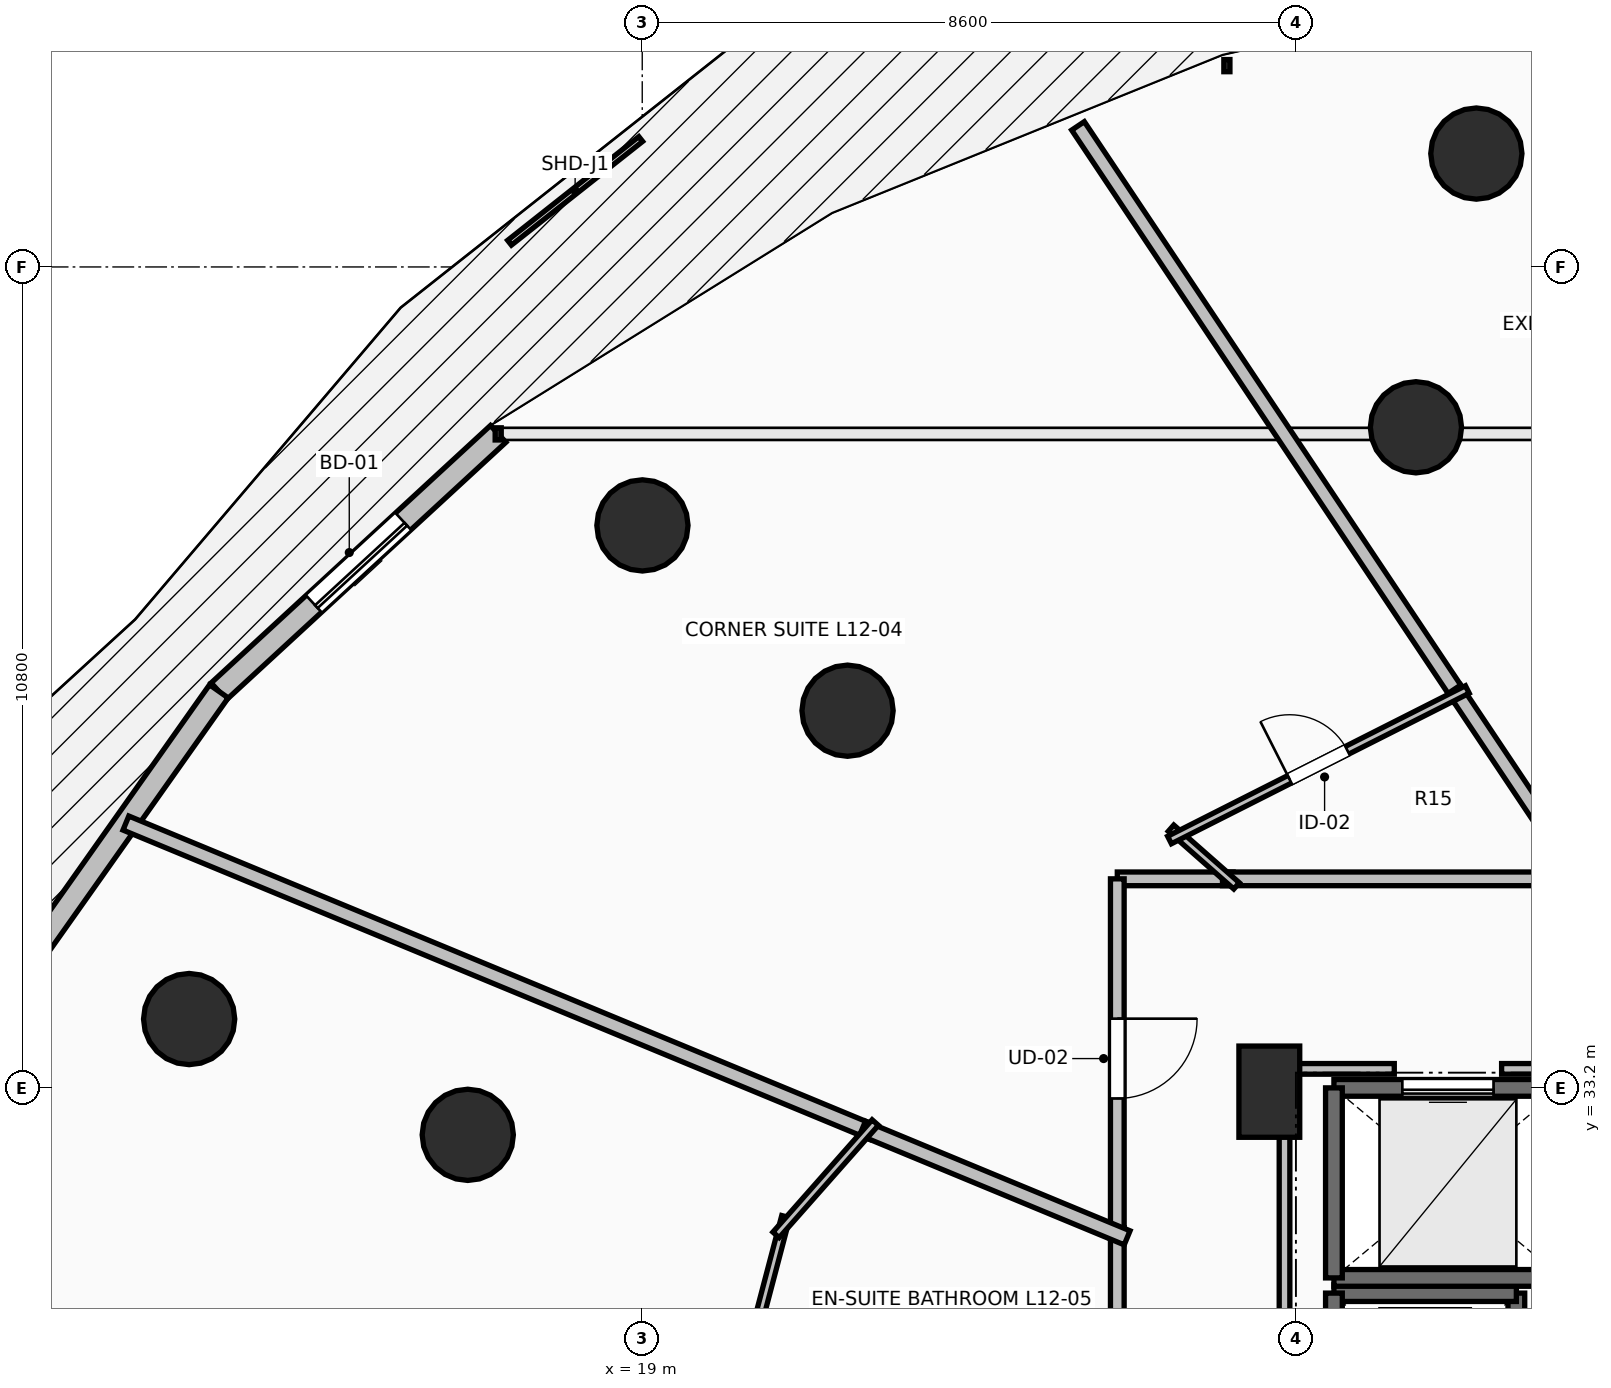
"""IFC4 building model, lengths in metres.
Left out: names, types, materials, properties, quantities, classifications, styles, units other than length and angle.
Written with IfcOpenShell. Run it as: python <this file> out.ifc"""

import sys

from ifc_helpers import new_model, si_unit, direction, frame, frame_2d, origin, origin_2d, place, context, subcontext, project, spatial, rectangle, circle, extrude, element, fill, save


model = new_model("IFC4")
c1 = context("Model", 3, precision=1e-05, world=origin(), true_north=direction((0.0, 1.0)))
c2 = subcontext(c1, "Body", "Model", "MODEL_VIEW")
j1 = project(units=[si_unit("LENGTHUNIT", "METRE"), si_unit("PLANEANGLEUNIT", "RADIAN")], contexts=[c1])
p1 = place(None, origin())
s1 = spatial("IfcSite", under=j1, at=p1, CompositionType="ELEMENT")
p2 = place(p1, origin())
s2 = spatial("IfcBuilding", under=s1, at=p2, CompositionType="ELEMENT")
p3 = place(p2, frame((0.0, 0.0, 48.5)))
s3 = spatial("IfcBuildingStorey", under=s2, at=p3, CompositionType="ELEMENT", Elevation=48.5)
for number, where, z_axis, x_axis in (
    (1, (29.179, 41.891, 0.0), (0.0, 0.0, 1.0), (-0.383, 0.924, 0.0)),
    (2, (21.701, 38.162, 0.0), (0.0, 0.0, 1.0), (-0.707, 0.707, 0.0)),
    (3, (16.705, 32.582, 0.0), (0.0, 0.0, 1.0), (-0.924, 0.383, 0.0)),
    (4, (29.974, 45.492, 0.0), (0.0, 0.0, 1.0), (-0.383, 0.924, 0.0)),
    (5, (19.003, 40.6, 0.0), (0.0, 0.0, 1.0), (-0.707, 0.707, 0.0)),
    (6, (13.039, 34.105, 0.0), (0.0, 0.0, 1.0), (-0.924, 0.383, 0.0)),
):
    element("IfcColumn", number, at=place(p3, frame(where, z_axis=z_axis, x_axis=x_axis)), inside=s3, PredefinedType="COLUMN", context=c2, shape_type="SweptSolid", body=[
        extrude(circle(Radius=0.6, at=origin_2d()), origin(), (0.0, 0.0, 1.0), 3.5),
    ])
p4 = place(p3, frame((27.25, 33.15, 0.0), z_axis=(0.0, 0.0, 1.0), x_axis=(1.0, 0.0, 0.0)))
e7 = element("IfcColumn", 7, at=p4, inside=s3, PredefinedType="PILASTER", context=c2, shape_type="SweptSolid", body=[
    extrude(rectangle(XDim=0.8, YDim=1.2, at=origin_2d()), origin(), (0.0, 0.0, 1.0), 3.5),
])
p5 = place(p3, frame((17.105, 41.804, 0.0), z_axis=(0.0, 0.0, 1.0), x_axis=(-0.735342629635, -0.677695519419, 0.0)))
e8 = element("IfcWall", 8, at=p5, inside=s3, PredefinedType="STANDARD", context=c2, shape_type="SweptSolid", body=[
    extrude(rectangle(XDim=4.997, YDim=0.3, at=frame_2d((2.499, 0.0))), origin(), (0.0, 0.0, 1.0), 3.24),
])
p6 = place(p5, frame((1.699, 0.0, 0.0)))
e9 = element("IfcOpeningElement", 9, at=p6, cuts=e8, PredefinedType="OPENING", context=c2, shape_type="SweptSolid", body=[
    extrude(rectangle(XDim=1.6, YDim=2.3, at=frame_2d((0.8, 1.15))), frame((0.0, 0.165, 0.0), z_axis=(0.0, -1.0, 0.0), x_axis=(1.0, 0.0, 0.0)), (0.0, 0.0, 1.0), 0.33),
])
p7 = place(p3, frame((13.43, 38.417, 0.0), z_axis=(0.0, 0.0, 1.0), x_axis=(-0.577130815624, -0.816651713803, 0.0)))
e10 = element("IfcWall", 10, at=p7, inside=s3, PredefinedType="STANDARD", context=c2, shape_type="SweptSolid", body=[
    extrude(rectangle(XDim=4.731, YDim=0.3, at=frame_2d((2.366, 0.0))), origin(), (0.0, 0.0, 1.0), 3.24),
])
p8 = place(p3, frame((30.5, 28.0, 0.0), z_axis=(0.0, 0.0, 1.0), x_axis=(0.0, 1.0, 0.0)))
e11 = element("IfcWall", 11, at=p8, inside=s3, PredefinedType="SHEAR", context=c2, shape_type="SweptSolid", body=[
    extrude(rectangle(XDim=2.5, YDim=0.22, at=frame_2d((1.25, 0.0))), origin(), (0.0, 0.0, 1.0), 3.24),
])
p9 = place(p3, frame((30.5, 30.5, 0.0), z_axis=(0.0, 0.0, 1.0), x_axis=(-1.0, 0.0, 0.0)))
e12 = element("IfcWall", 12, at=p9, inside=s3, PredefinedType="SHEAR", context=c2, shape_type="SweptSolid", body=[
    extrude(rectangle(XDim=2.4, YDim=0.22, at=frame_2d((1.2, 0.0))), origin(), (0.0, 0.0, 1.0), 3.24),
])
p10 = place(p3, frame((28.1, 30.5, 0.0), z_axis=(0.0, 0.0, 1.0), x_axis=(0.0, -1.0, 0.0)))
e13 = element("IfcWall", 13, at=p10, inside=s3, PredefinedType="SHEAR", context=c2, shape_type="SweptSolid", body=[
    extrude(rectangle(XDim=2.5, YDim=0.22, at=frame_2d((1.25, 0.0))), origin(), (0.0, 0.0, 1.0), 3.24),
])
p11 = place(p3, frame((28.1, 30.7, 0.0), z_axis=(0.0, 0.0, 1.0), x_axis=(1.0, 0.0, 0.0)))
e14 = element("IfcWall", 14, at=p11, inside=s3, PredefinedType="SOLIDWALL", context=c2, shape_type="SweptSolid", body=[
    extrude(rectangle(XDim=3.0, YDim=0.22, at=frame_2d((1.5, 0.0))), origin(), (0.0, 0.0, 1.0), 3.24),
])
p12 = place(p3, frame((31.1, 33.2, 0.0), z_axis=(0.0, 0.0, 1.0), x_axis=(-1.0, 0.0, 0.0)))
e15 = element("IfcWall", 15, at=p12, inside=s3, PredefinedType="SOLIDWALL", context=c2, shape_type="SweptSolid", body=[
    extrude(rectangle(XDim=3.0, YDim=0.22, at=frame_2d((1.5, 0.0))), origin(), (0.0, 0.0, 1.0), 3.24),
])
p13 = place(p12, frame((0.9, 0.0, 0.0)))
e16 = element("IfcOpeningElement", 16, at=p13, cuts=e15, PredefinedType="OPENING", context=c2, shape_type="SweptSolid", body=[
    extrude(rectangle(XDim=1.2, YDim=2.2, at=frame_2d((0.6, 1.1))), frame((0.0, 0.125, 0.0), z_axis=(0.0, -1.0, 0.0), x_axis=(1.0, 0.0, 0.0)), (0.0, 0.0, 1.0), 0.25),
])
p14 = place(p3, frame((28.1, 33.2, 0.0), z_axis=(0.0, 0.0, 1.0), x_axis=(0.0, -1.0, 0.0)))
e17 = element("IfcWall", 17, at=p14, inside=s3, PredefinedType="SOLIDWALL", context=c2, shape_type="SweptSolid", body=[
    extrude(rectangle(XDim=2.5, YDim=0.22, at=frame_2d((1.25, 0.0))), origin(), (0.0, 0.0, 1.0), 3.24),
])
p15 = place(p3, frame((26.774, 35.95, 0.0), z_axis=(0.0, 0.0, 1.0), x_axis=(-1.0, 0.0, 0.0)))
e18 = element("IfcWall", 18, at=p15, inside=s3, PredefinedType="PARTITIONING", context=c2, shape_type="SweptSolid", body=[
    extrude(rectangle(XDim=1.524, YDim=0.18, at=frame_2d((0.762, 0.0))), origin(), (0.0, 0.0, 1.0), 2.886),
])
p16 = place(p3, frame((25.25, 35.95, 0.0), z_axis=(0.0, 0.0, 1.0), x_axis=(0.0, -1.0, 0.0)))
e19 = element("IfcWall", 19, at=p16, inside=s3, PredefinedType="PARTITIONING", context=c2, shape_type="SweptSolid", body=[
    extrude(rectangle(XDim=4.729, YDim=0.18, at=frame_2d((2.365, 0.0))), origin(), (0.0, 0.0, 1.0), 2.432),
])
p17 = place(p16, frame((1.84, 0.0, 0.0)))
e20 = element("IfcOpeningElement", 20, at=p17, cuts=e19, PredefinedType="OPENING", context=c2, shape_type="SweptSolid", body=[
    extrude(rectangle(XDim=1.05, YDim=2.2, at=frame_2d((0.525, 1.1))), frame((0.0, 0.105, 0.0), z_axis=(0.0, -1.0, 0.0), x_axis=(1.0, 0.0, 0.0)), (0.0, 0.0, 1.0), 0.21),
])
p18 = place(p3, frame((31.42, 35.95, 0.0), z_axis=(0.0, 0.0, 1.0), x_axis=(-1.0, 0.0, 0.0)))
e21 = element("IfcWall", 21, at=p18, inside=s3, PredefinedType="PARTITIONING", context=c2, shape_type="SweptSolid", body=[
    extrude(rectangle(XDim=4.786, YDim=0.18, at=frame_2d((2.393, 0.0))), origin(), (0.0, 0.0, 1.0), 2.432),
])
p19 = place(p3, frame((25.25, 31.361, 0.0), z_axis=(0.0, 0.0, 1.0), x_axis=(0.0, -1.0, 0.0)))
e22 = element("IfcWall", 22, at=p19, inside=s3, PredefinedType="PARTITIONING", context=c2, shape_type="SweptSolid", body=[
    extrude(rectangle(XDim=3.727, YDim=0.18, at=frame_2d((1.864, 0.0))), origin(), (0.0, 0.0, 1.0), 2.432),
])
p20 = place(p3, frame((24.733, 45.856, 0.0), z_axis=(0.0, 0.0, 1.0), x_axis=(0.555564858458, -0.831473203444, 0.0)))
e23 = element("IfcWall", 23, at=p20, inside=s3, PredefinedType="PARTITIONING", context=c2, shape_type="SweptSolid", body=[
    extrude(rectangle(XDim=9.054, YDim=0.2, at=frame_2d((4.527, 0.0))), origin(), (0.0, 0.0, 1.0), 2.432),
])
p21 = place(p3, frame((29.685, 38.444, 0.0), z_axis=(0.0, 0.0, 1.0), x_axis=(0.555596981897, -0.831451738652, 0.0)))
e24 = element("IfcWall", 24, at=p21, inside=s3, PredefinedType="PARTITIONING", context=c2, shape_type="SweptSolid", body=[
    extrude(rectangle(XDim=3.14, YDim=0.2, at=frame_2d((1.57, 0.0))), origin(), (0.0, 0.0, 1.0), 2.432),
])
p22 = place(p3, frame((26.819, 35.857, 0.0), z_axis=(0.0, 0.0, 1.0), x_axis=(-0.750624975639, 0.660728496394, 0.0)))
e25 = element("IfcWall", 25, at=p22, inside=s3, PredefinedType="PARTITIONING", context=c2, shape_type="SweptSolid", body=[
    extrude(rectangle(XDim=1.149, YDim=0.11, at=frame_2d((0.574, 0.0))), origin(), (0.0, 0.0, 1.0), 2.886),
])
p23 = place(p3, frame((25.937, 36.461, 0.0), z_axis=(0.0, 0.0, 1.0), x_axis=(0.892461080662, 0.451124394711, 0.0)))
e26 = element("IfcWall", 26, at=p23, inside=s3, PredefinedType="PARTITIONING", context=c2, shape_type="SweptSolid", body=[
    extrude(rectangle(XDim=4.39, YDim=0.11, at=frame_2d((2.195, 0.0))), origin(), (0.0, 0.0, 1.0), 2.432),
])
p24 = place(p23, frame((1.77, 0.0, 0.0)))
e27 = element("IfcOpeningElement", 27, at=p24, cuts=e26, PredefinedType="OPENING", context=c2, shape_type="SweptSolid", body=[
    extrude(rectangle(XDim=0.85, YDim=2.1, at=frame_2d((0.425, 1.05))), frame((0.0, 0.07, 0.0), z_axis=(0.0, -1.0, 0.0), x_axis=(1.0, 0.0, 0.0)), (0.0, 0.0, 1.0), 0.14),
])
p25 = place(p3, frame((12.207, 36.684, 0.0), z_axis=(0.0, 0.0, 1.0), x_axis=(0.923876032578, -0.382691881842, 0.0)))
e28 = element("IfcWall", 28, at=p25, inside=s3, PredefinedType="PARTITIONING", context=c2, shape_type="SweptSolid", body=[
    extrude(rectangle(XDim=10.63, YDim=0.2, at=frame_2d((5.315, 0.0))), origin(), (0.0, 0.0, 1.0), 2.624),
])
p26 = place(p3, frame((21.899, 32.669, 0.0), z_axis=(0.0, 0.0, 1.0), x_axis=(0.923843852071, -0.382769561211, 0.0)))
e29 = element("IfcWall", 29, at=p26, inside=s3, PredefinedType="PARTITIONING", context=c2, shape_type="SweptSolid", body=[
    extrude(rectangle(XDim=3.768, YDim=0.2, at=frame_2d((1.884, 0.0))), origin(), (0.0, 0.0, 1.0), 2.886),
])
p27 = place(p3, frame((20.037, 28.273, 0.0), z_axis=(0.0, 0.0, 1.0), x_axis=(0.254593926267, 0.967048050878, 0.0)))
e30 = element("IfcWall", 30, at=p27, inside=s3, PredefinedType="PARTITIONING", context=c2, shape_type="SweptSolid", body=[
    extrude(rectangle(XDim=3.344, YDim=0.11, at=frame_2d((1.672, 0.0))), origin(), (0.0, 0.0, 1.0), 2.432),
])
p28 = place(p3, frame((20.76, 31.266, 0.0), z_axis=(0.0, 0.0, 1.0), x_axis=(0.662047420969, 0.749461948593, 0.0)))
e31 = element("IfcWall", 31, at=p28, inside=s3, PredefinedType="PARTITIONING", context=c2, shape_type="SweptSolid", body=[
    extrude(rectangle(XDim=1.972, YDim=0.11, at=frame_2d((0.986, 0.0))), origin(), (0.0, 0.0, 1.0), 3.24),
])
p29 = place(p3, frame((27.45, 28.196, 0.0), z_axis=(0.0, 0.0, 1.0), x_axis=(0.0, 1.0, 0.0)))
e32 = element("IfcWall", 32, at=p29, inside=s3, PredefinedType="PARTITIONING", context=c2, shape_type="SweptSolid", body=[
    extrude(rectangle(XDim=5.254, YDim=0.14, at=frame_2d((2.627, 0.0))), origin(), (0.0, 0.0, 1.0), 2.432),
])
p30 = place(p3, frame((27.45, 33.45, 0.0), z_axis=(0.0, 0.0, 1.0), x_axis=(1.0, 0.0, 0.0)))
e33 = element("IfcWall", 33, at=p30, inside=s3, PredefinedType="PARTITIONING", context=c2, shape_type="SweptSolid", body=[
    extrude(rectangle(XDim=1.444, YDim=0.14, at=frame_2d((0.722, 0.0))), origin(), (0.0, 0.0, 1.0), 2.432),
])
p31 = place(p3, frame((30.306, 33.45, 0.0), z_axis=(0.0, 0.0, 1.0), x_axis=(1.0, 0.0, 0.0)))
e34 = element("IfcWall", 34, at=p31, inside=s3, PredefinedType="PARTITIONING", context=c2, shape_type="SweptSolid", body=[
    extrude(rectangle(XDim=0.674, YDim=0.14, at=frame_2d((0.337, 0.0))), origin(), (0.0, 0.0, 1.0), 3.24),
])
p32 = place(p6, origin())
e35 = element("IfcDoor", 35, at=p32, inside=s3, OperationType="SLIDING_TO_LEFT", PredefinedType="DOOR", context=c2, shape_type="SweptSolid", body=[
    extrude(rectangle(XDim=1.6, YDim=2.3, at=frame_2d((0.8, 1.15))), frame((0.0, 0.025, 0.0), z_axis=(0.0, -1.0, 0.0), x_axis=(1.0, 0.0, 0.0)), (0.0, 0.0, 1.0), 0.05),
])
fill(e9, e35)
p33 = place(p13, origin())
e36 = element("IfcDoor", 36, at=p33, inside=s3, OperationType="SLIDING_TO_LEFT", PredefinedType="DOOR", context=c2, shape_type="SweptSolid", body=[
    extrude(rectangle(XDim=1.2, YDim=2.2, at=frame_2d((0.6, 1.1))), frame((0.0, 0.025, 0.0), z_axis=(0.0, -1.0, 0.0), x_axis=(1.0, 0.0, 0.0)), (0.0, 0.0, 1.0), 0.05),
])
fill(e16, e36)
p34 = place(p17, origin())
e37 = element("IfcDoor", 37, at=p34, inside=s3, OperationType="SINGLE_SWING_LEFT", PredefinedType="DOOR", context=c2, shape_type="SweptSolid", body=[
    extrude(rectangle(XDim=1.05, YDim=2.2, at=frame_2d((0.525, 1.1))), frame((0.0, 0.025, 0.0), z_axis=(0.0, -1.0, 0.0), x_axis=(1.0, 0.0, 0.0)), (0.0, 0.0, 1.0), 0.05),
])
fill(e20, e37)
p35 = place(p24, origin())
e38 = element("IfcDoor", 38, at=p35, inside=s3, OperationType="SINGLE_SWING_LEFT", PredefinedType="DOOR", context=c2, shape_type="SweptSolid", body=[
    extrude(rectangle(XDim=0.85, YDim=2.1, at=frame_2d((0.425, 1.05))), frame((0.0, 0.025, 0.0), z_axis=(0.0, -1.0, 0.0), x_axis=(1.0, 0.0, 0.0)), (0.0, 0.0, 1.0), 0.05),
])
fill(e27, e38)
save(model, sys.argv[1])
